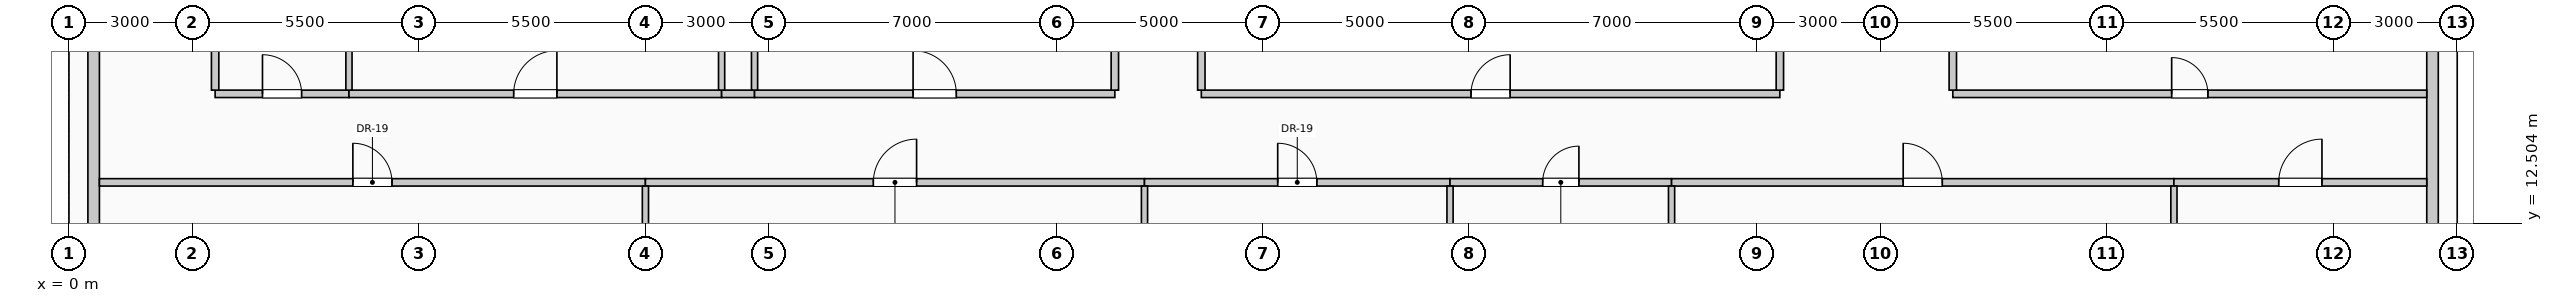
"""IFC4 building model, lengths in metres.
Left out: names, types, materials, properties, quantities, classifications, styles, units other than length and angle.
Written with IfcOpenShell. Run it as: python <this file> out.ifc"""

import sys

from ifc_helpers import new_model, si_unit, direction, frame, frame_2d, origin, place, context, subcontext, project, spatial, rectangle, extrude, element, fill, save


model = new_model("IFC4")
c1 = context("Model", 3, precision=1e-05, world=origin(), true_north=direction((0.0, 1.0)))
c2 = subcontext(c1, "Body", "Model", "MODEL_VIEW")
j1 = project(units=[si_unit("LENGTHUNIT", "METRE"), si_unit("PLANEANGLEUNIT", "RADIAN")], contexts=[c1])
p1 = place(None, origin())
s1 = spatial("IfcSite", under=j1, at=p1, CompositionType="ELEMENT")
p2 = place(p1, origin())
s2 = spatial("IfcBuilding", under=s1, at=p2, CompositionType="ELEMENT")
p3 = place(p2, frame((0.0, 0.0, 112.6)))
s3 = spatial("IfcBuildingStorey", under=s2, at=p3, CompositionType="ELEMENT", Elevation=112.6)
for number, where, z_axis, x_axis in (
    (1, (0.6, 10.445, 0.0), (0.0, 0.0, 1.0), (0.0, 1.0, 0.0)),
    (2, (57.4, 17.555, 0.0), (0.0, 0.0, 1.0), (0.0, -1.0, 0.0)),
):
    element("IfcWall", number, at=place(p3, frame(where, z_axis=z_axis, x_axis=x_axis)), inside=s3, PredefinedType="SOLIDWALL", context=c2, shape_type="SweptSolid", body=[
        extrude(rectangle(XDim=7.11, YDim=0.28, at=frame_2d((3.555, 0.0))), origin(), (0.0, 0.0, 1.0), 2.875),
    ])
p4 = place(p3, frame((0.74, 13.5, 0.0), z_axis=(0.0, 0.0, 1.0), x_axis=(1.0, 0.0, 0.0)))
e3 = element("IfcWall", 3, at=p4, inside=s3, PredefinedType="PARTITIONING", context=c2, shape_type="SweptSolid", body=[
    extrude(rectangle(XDim=13.26, YDim=0.18, at=frame_2d((6.63, 0.0))), origin(), (0.0, 0.0, 1.0), 3.725),
])
p5 = place(p4, frame((6.155, 0.0, 0.0)))
e4 = element("IfcOpeningElement", 4, at=p5, cuts=e3, PredefinedType="OPENING", context=c2, shape_type="SweptSolid", body=[
    extrude(rectangle(XDim=0.95, YDim=2.15, at=frame_2d((0.475, 1.075))), frame((0.0, 0.1, 0.0), z_axis=(0.0, -1.0, 0.0), x_axis=(1.0, 0.0, 0.0)), (0.0, 0.0, 1.0), 0.2),
])
p6 = place(p3, frame((14.0, 13.5, 0.0), z_axis=(0.0, 0.0, 1.0), x_axis=(1.0, 0.0, 0.0)))
e5 = element("IfcWall", 5, at=p6, inside=s3, PredefinedType="PARTITIONING", context=c2, shape_type="SweptSolid", body=[
    extrude(rectangle(XDim=12.12, YDim=0.18, at=frame_2d((6.06, 0.0))), origin(), (0.0, 0.0, 1.0), 3.725),
])
p7 = place(p6, frame((5.535, 0.0, 0.0)))
e6 = element("IfcOpeningElement", 6, at=p7, cuts=e5, PredefinedType="OPENING", context=c2, shape_type="SweptSolid", body=[
    extrude(rectangle(XDim=1.05, YDim=2.15, at=frame_2d((0.525, 1.075))), frame((0.0, 0.1, 0.0), z_axis=(0.0, -1.0, 0.0), x_axis=(1.0, 0.0, 0.0)), (0.0, 0.0, 1.0), 0.2),
])
p8 = place(p3, frame((26.12, 13.5, 0.0), z_axis=(0.0, 0.0, 1.0), x_axis=(1.0, 0.0, 0.0)))
e7 = element("IfcWall", 7, at=p8, inside=s3, PredefinedType="PARTITIONING", context=c2, shape_type="SweptSolid", body=[
    extrude(rectangle(XDim=7.42, YDim=0.18, at=frame_2d((3.71, 0.0))), origin(), (0.0, 0.0, 1.0), 3.725),
])
p9 = place(p8, frame((3.235, 0.0, 0.0)))
e8 = element("IfcOpeningElement", 8, at=p9, cuts=e7, PredefinedType="OPENING", context=c2, shape_type="SweptSolid", body=[
    extrude(rectangle(XDim=0.95, YDim=2.15, at=frame_2d((0.475, 1.075))), frame((0.0, 0.1, 0.0), z_axis=(0.0, -1.0, 0.0), x_axis=(1.0, 0.0, 0.0)), (0.0, 0.0, 1.0), 0.2),
])
p10 = place(p3, frame((33.54, 13.5, 0.0), z_axis=(0.0, 0.0, 1.0), x_axis=(1.0, 0.0, 0.0)))
e9 = element("IfcWall", 9, at=p10, inside=s3, PredefinedType="PARTITIONING", context=c2, shape_type="SweptSolid", body=[
    extrude(rectangle(XDim=5.38, YDim=0.18, at=frame_2d((2.69, 0.0))), origin(), (0.0, 0.0, 1.0), 3.725),
])
p11 = place(p10, frame((2.25, 0.0, 0.0)))
e10 = element("IfcOpeningElement", 10, at=p11, cuts=e9, PredefinedType="OPENING", context=c2, shape_type="SweptSolid", body=[
    extrude(rectangle(XDim=0.88, YDim=2.1, at=frame_2d((0.44, 1.05))), frame((0.0, 0.1, 0.0), z_axis=(0.0, -1.0, 0.0), x_axis=(1.0, 0.0, 0.0)), (0.0, 0.0, 1.0), 0.2),
])
p12 = place(p3, frame((38.92, 13.5, 0.0), z_axis=(0.0, 0.0, 1.0), x_axis=(1.0, 0.0, 0.0)))
e11 = element("IfcWall", 11, at=p12, inside=s3, PredefinedType="PARTITIONING", context=c2, shape_type="SweptSolid", body=[
    extrude(rectangle(XDim=12.2, YDim=0.18, at=frame_2d((6.1, 0.0))), origin(), (0.0, 0.0, 1.0), 3.725),
])
p13 = place(p12, frame((5.625, 0.0, 0.0)))
e12 = element("IfcOpeningElement", 12, at=p13, cuts=e11, PredefinedType="OPENING", context=c2, shape_type="SweptSolid", body=[
    extrude(rectangle(XDim=0.95, YDim=2.15, at=frame_2d((0.475, 1.075))), frame((0.0, 0.1, 0.0), z_axis=(0.0, -1.0, 0.0), x_axis=(1.0, 0.0, 0.0)), (0.0, 0.0, 1.0), 0.2),
])
p14 = place(p3, frame((51.12, 13.5, 0.0), z_axis=(0.0, 0.0, 1.0), x_axis=(1.0, 0.0, 0.0)))
e13 = element("IfcWall", 13, at=p14, inside=s3, PredefinedType="PARTITIONING", context=c2, shape_type="SweptSolid", body=[
    extrude(rectangle(XDim=6.14, YDim=0.18, at=frame_2d((3.07, 0.0))), origin(), (0.0, 0.0, 1.0), 3.725),
])
p15 = place(p14, frame((2.545, 0.0, 0.0)))
e14 = element("IfcOpeningElement", 14, at=p15, cuts=e13, PredefinedType="OPENING", context=c2, shape_type="SweptSolid", body=[
    extrude(rectangle(XDim=1.05, YDim=2.15, at=frame_2d((0.525, 1.075))), frame((0.0, 0.1, 0.0), z_axis=(0.0, -1.0, 0.0), x_axis=(1.0, 0.0, 0.0)), (0.0, 0.0, 1.0), 0.2),
])
p16 = place(p3, frame((3.55, 15.65, 0.0), z_axis=(0.0, 0.0, 1.0), x_axis=(1.0, 0.0, 0.0)))
e15 = element("IfcWall", 15, at=p16, inside=s3, PredefinedType="PARTITIONING", context=c2, shape_type="SweptSolid", body=[
    extrude(rectangle(XDim=3.25, YDim=0.18, at=frame_2d((1.625, 0.0))), origin(), (0.0, 0.0, 1.0), 3.725),
])
p17 = place(p16, frame((1.15, 0.0, 0.0)))
e16 = element("IfcOpeningElement", 16, at=p17, cuts=e15, PredefinedType="OPENING", context=c2, shape_type="SweptSolid", body=[
    extrude(rectangle(XDim=0.95, YDim=2.15, at=frame_2d((0.475, 1.075))), frame((0.0, 0.1, 0.0), z_axis=(0.0, -1.0, 0.0), x_axis=(1.0, 0.0, 0.0)), (0.0, 0.0, 1.0), 0.2),
])
p18 = place(p3, frame((6.8, 15.65, 0.0), z_axis=(0.0, 0.0, 1.0), x_axis=(1.0, 0.0, 0.0)))
e17 = element("IfcWall", 17, at=p18, inside=s3, PredefinedType="PARTITIONING", context=c2, shape_type="SweptSolid", body=[
    extrude(rectangle(XDim=9.05, YDim=0.18, at=frame_2d((4.525, 0.0))), origin(), (0.0, 0.0, 1.0), 3.725),
])
p19 = place(p18, frame((4.0, 0.0, 0.0)))
e18 = element("IfcOpeningElement", 18, at=p19, cuts=e17, PredefinedType="OPENING", context=c2, shape_type="SweptSolid", body=[
    extrude(rectangle(XDim=1.05, YDim=2.15, at=frame_2d((0.525, 1.075))), frame((0.0, 0.1, 0.0), z_axis=(0.0, -1.0, 0.0), x_axis=(1.0, 0.0, 0.0)), (0.0, 0.0, 1.0), 0.2),
])
p20 = place(p3, frame((15.85, 15.65, 0.0), z_axis=(0.0, 0.0, 1.0), x_axis=(1.0, 0.0, 0.0)))
e19 = element("IfcWall", 19, at=p20, inside=s3, PredefinedType="PARTITIONING", context=c2, shape_type="SweptSolid", body=[
    extrude(rectangle(XDim=0.8, YDim=0.18, at=frame_2d((0.4, 0.0))), origin(), (0.0, 0.0, 1.0), 3.725),
])
p21 = place(p3, frame((16.65, 15.65, 0.0), z_axis=(0.0, 0.0, 1.0), x_axis=(1.0, 0.0, 0.0)))
e20 = element("IfcWall", 20, at=p21, inside=s3, PredefinedType="PARTITIONING", context=c2, shape_type="SweptSolid", body=[
    extrude(rectangle(XDim=8.75, YDim=0.18, at=frame_2d((4.375, 0.0))), origin(), (0.0, 0.0, 1.0), 3.725),
])
p22 = place(p21, frame((3.85, 0.0, 0.0)))
e21 = element("IfcOpeningElement", 21, at=p22, cuts=e20, PredefinedType="OPENING", context=c2, shape_type="SweptSolid", body=[
    extrude(rectangle(XDim=1.05, YDim=2.15, at=frame_2d((0.525, 1.075))), frame((0.0, 0.1, 0.0), z_axis=(0.0, -1.0, 0.0), x_axis=(1.0, 0.0, 0.0)), (0.0, 0.0, 1.0), 0.2),
])
p23 = place(p3, frame((27.5, 15.65, 0.0), z_axis=(0.0, 0.0, 1.0), x_axis=(1.0, 0.0, 0.0)))
e22 = element("IfcWall", 22, at=p23, inside=s3, PredefinedType="PARTITIONING", context=c2, shape_type="SweptSolid", body=[
    extrude(rectangle(XDim=14.05, YDim=0.18, at=frame_2d((7.025, 0.0))), origin(), (0.0, 0.0, 1.0), 3.725),
])
p24 = place(p23, frame((6.55, 0.0, 0.0)))
e23 = element("IfcOpeningElement", 23, at=p24, cuts=e22, PredefinedType="OPENING", context=c2, shape_type="SweptSolid", body=[
    extrude(rectangle(XDim=0.95, YDim=2.15, at=frame_2d((0.475, 1.075))), frame((0.0, 0.1, 0.0), z_axis=(0.0, -1.0, 0.0), x_axis=(1.0, 0.0, 0.0)), (0.0, 0.0, 1.0), 0.2),
])
p25 = place(p3, frame((45.75, 15.65, 0.0), z_axis=(0.0, 0.0, 1.0), x_axis=(1.0, 0.0, 0.0)))
e24 = element("IfcWall", 24, at=p25, inside=s3, PredefinedType="PARTITIONING", context=c2, shape_type="SweptSolid", body=[
    extrude(rectangle(XDim=11.51, YDim=0.18, at=frame_2d((5.755, 0.0))), origin(), (0.0, 0.0, 1.0), 3.725),
])
p26 = place(p25, frame((5.315, 0.0, 0.0)))
e25 = element("IfcOpeningElement", 25, at=p26, cuts=e24, PredefinedType="OPENING", context=c2, shape_type="SweptSolid", body=[
    extrude(rectangle(XDim=0.88, YDim=2.1, at=frame_2d((0.44, 1.05))), frame((0.0, 0.1, 0.0), z_axis=(0.0, -1.0, 0.0), x_axis=(1.0, 0.0, 0.0)), (0.0, 0.0, 1.0), 0.2),
])
p27 = place(p3, frame((3.55, 15.74, 0.0), z_axis=(0.0, 0.0, 1.0), x_axis=(0.0, 1.0, 0.0)))
e26 = element("IfcWall", 26, at=p27, inside=s3, PredefinedType="PARTITIONING", context=c2, shape_type="SweptSolid", body=[
    extrude(rectangle(XDim=3.135, YDim=0.18, at=frame_2d((1.567, 0.0))), origin(), (0.0, 0.0, 1.0), 3.725),
])
p28 = place(p3, frame((6.8, 15.74, 0.0), z_axis=(0.0, 0.0, 1.0), x_axis=(0.0, 1.0, 0.0)))
e27 = element("IfcWall", 27, at=p28, inside=s3, PredefinedType="PARTITIONING", context=c2, shape_type="SweptSolid", body=[
    extrude(rectangle(XDim=3.135, YDim=0.15, at=frame_2d((1.567, 0.0))), origin(), (0.0, 0.0, 1.0), 3.725),
])
p29 = place(p3, frame((14.0, 1.175, 0.0), z_axis=(0.0, 0.0, 1.0), x_axis=(0.0, 1.0, 0.0)))
e28 = element("IfcWall", 28, at=p29, inside=s3, PredefinedType="PARTITIONING", context=c2, shape_type="SweptSolid", body=[
    extrude(rectangle(XDim=12.235, YDim=0.15, at=frame_2d((6.117, 0.0))), origin(), (0.0, 0.0, 1.0), 3.725),
])
p30 = place(p3, frame((15.85, 15.74, 0.0), z_axis=(0.0, 0.0, 1.0), x_axis=(0.0, 1.0, 0.0)))
e29 = element("IfcWall", 29, at=p30, inside=s3, PredefinedType="PARTITIONING", context=c2, shape_type="SweptSolid", body=[
    extrude(rectangle(XDim=1.76, YDim=0.15, at=frame_2d((0.88, 0.0))), origin(), (0.0, 0.0, 1.0), 3.725),
])
p31 = place(p3, frame((16.65, 15.74, 0.0), z_axis=(0.0, 0.0, 1.0), x_axis=(0.0, 1.0, 0.0)))
e30 = element("IfcWall", 30, at=p31, inside=s3, PredefinedType="PARTITIONING", context=c2, shape_type="SweptSolid", body=[
    extrude(rectangle(XDim=1.76, YDim=0.15, at=frame_2d((0.88, 0.0))), origin(), (0.0, 0.0, 1.0), 3.07),
])
p32 = place(p3, frame((25.4, 15.74, 0.0), z_axis=(0.0, 0.0, 1.0), x_axis=(0.0, 1.0, 0.0)))
e31 = element("IfcWall", 31, at=p32, inside=s3, PredefinedType="PARTITIONING", context=c2, shape_type="SweptSolid", body=[
    extrude(rectangle(XDim=7.585, YDim=0.18, at=frame_2d((3.792, 0.0))), origin(), (0.0, 0.0, 1.0), 3.725),
])
p33 = place(p3, frame((26.12, 0.74, 0.0), z_axis=(0.0, 0.0, 1.0), x_axis=(0.0, 1.0, 0.0)))
e32 = element("IfcWall", 32, at=p33, inside=s3, PredefinedType="PARTITIONING", context=c2, shape_type="SweptSolid", body=[
    extrude(rectangle(XDim=12.67, YDim=0.15, at=frame_2d((6.335, 0.0))), origin(), (0.0, 0.0, 1.0), 3.725),
])
p34 = place(p3, frame((27.5, 15.74, 0.0), z_axis=(0.0, 0.0, 1.0), x_axis=(0.0, 1.0, 0.0)))
e33 = element("IfcWall", 33, at=p34, inside=s3, PredefinedType="PARTITIONING", context=c2, shape_type="SweptSolid", body=[
    extrude(rectangle(XDim=9.57, YDim=0.18, at=frame_2d((4.785, 0.0))), origin(), (0.0, 0.0, 1.0), 3.725),
])
p35 = place(p3, frame((33.54, 1.3, 0.0), z_axis=(0.0, 0.0, 1.0), x_axis=(0.0, 1.0, 0.0)))
e34 = element("IfcWall", 34, at=p35, inside=s3, PredefinedType="PARTITIONING", context=c2, shape_type="SweptSolid", body=[
    extrude(rectangle(XDim=12.11, YDim=0.15, at=frame_2d((6.055, 0.0))), origin(), (0.0, 0.0, 1.0), 3.725),
])
p36 = place(p3, frame((38.92, 0.74, 0.0), z_axis=(0.0, 0.0, 1.0), x_axis=(0.0, 1.0, 0.0)))
e35 = element("IfcWall", 35, at=p36, inside=s3, PredefinedType="PARTITIONING", context=c2, shape_type="SweptSolid", body=[
    extrude(rectangle(XDim=12.67, YDim=0.15, at=frame_2d((6.335, 0.0))), origin(), (0.0, 0.0, 1.0), 3.725),
])
p37 = place(p3, frame((41.55, 15.74, 0.0), z_axis=(0.0, 0.0, 1.0), x_axis=(0.0, 1.0, 0.0)))
e36 = element("IfcWall", 36, at=p37, inside=s3, PredefinedType="PARTITIONING", context=c2, shape_type="SweptSolid", body=[
    extrude(rectangle(XDim=1.76, YDim=0.18, at=frame_2d((0.88, 0.0))), origin(), (0.0, 0.0, 1.0), 3.07),
])
p38 = place(p3, frame((45.75, 15.74, 0.0), z_axis=(0.0, 0.0, 1.0), x_axis=(0.0, 1.0, 0.0)))
e37 = element("IfcWall", 37, at=p38, inside=s3, PredefinedType="PARTITIONING", context=c2, shape_type="SweptSolid", body=[
    extrude(rectangle(XDim=16.535, YDim=0.18, at=frame_2d((8.268, 0.0))), origin(), (0.0, 0.0, 1.0), 3.725),
])
p39 = place(p3, frame((51.12, 0.74, 0.0), z_axis=(0.0, 0.0, 1.0), x_axis=(0.0, 1.0, 0.0)))
e38 = element("IfcWall", 38, at=p39, inside=s3, PredefinedType="PARTITIONING", context=c2, shape_type="SweptSolid", body=[
    extrude(rectangle(XDim=12.67, YDim=0.15, at=frame_2d((6.335, 0.0))), origin(), (0.0, 0.0, 1.0), 3.725),
])
p40 = place(p5, origin())
e39 = element("IfcDoor", 39, at=p40, inside=s3, OperationType="SINGLE_SWING_LEFT", PredefinedType="DOOR", context=c2, shape_type="SweptSolid", body=[
    extrude(rectangle(XDim=0.95, YDim=2.15, at=frame_2d((0.475, 1.075))), frame((0.0, 0.025, 0.0), z_axis=(0.0, -1.0, 0.0), x_axis=(1.0, 0.0, 0.0)), (0.0, 0.0, 1.0), 0.05),
])
fill(e4, e39)
p41 = place(p7, origin())
e40 = element("IfcDoor", 40, at=p41, inside=s3, OperationType="SINGLE_SWING_RIGHT", PredefinedType="DOOR", context=c2, shape_type="SweptSolid", body=[
    extrude(rectangle(XDim=1.05, YDim=2.15, at=frame_2d((0.525, 1.075))), frame((0.0, 0.025, 0.0), z_axis=(0.0, -1.0, 0.0), x_axis=(1.0, 0.0, 0.0)), (0.0, 0.0, 1.0), 0.05),
])
fill(e6, e40)
p42 = place(p9, origin())
e41 = element("IfcDoor", 41, at=p42, inside=s3, OperationType="SINGLE_SWING_LEFT", PredefinedType="DOOR", context=c2, shape_type="SweptSolid", body=[
    extrude(rectangle(XDim=0.95, YDim=2.15, at=frame_2d((0.475, 1.075))), frame((0.0, 0.025, 0.0), z_axis=(0.0, -1.0, 0.0), x_axis=(1.0, 0.0, 0.0)), (0.0, 0.0, 1.0), 0.05),
])
fill(e8, e41)
p43 = place(p11, origin())
e42 = element("IfcDoor", 42, at=p43, inside=s3, OperationType="SINGLE_SWING_RIGHT", PredefinedType="DOOR", context=c2, shape_type="SweptSolid", body=[
    extrude(rectangle(XDim=0.88, YDim=2.1, at=frame_2d((0.44, 1.05))), frame((0.0, 0.025, 0.0), z_axis=(0.0, -1.0, 0.0), x_axis=(1.0, 0.0, 0.0)), (0.0, 0.0, 1.0), 0.05),
])
fill(e10, e42)
p44 = place(p13, origin())
e43 = element("IfcDoor", 43, at=p44, inside=s3, OperationType="SINGLE_SWING_LEFT", PredefinedType="DOOR", context=c2, shape_type="SweptSolid", body=[
    extrude(rectangle(XDim=0.95, YDim=2.15, at=frame_2d((0.475, 1.075))), frame((0.0, 0.025, 0.0), z_axis=(0.0, -1.0, 0.0), x_axis=(1.0, 0.0, 0.0)), (0.0, 0.0, 1.0), 0.05),
])
fill(e12, e43)
p45 = place(p15, origin())
e44 = element("IfcDoor", 44, at=p45, inside=s3, OperationType="SINGLE_SWING_RIGHT", PredefinedType="DOOR", context=c2, shape_type="SweptSolid", body=[
    extrude(rectangle(XDim=1.05, YDim=2.15, at=frame_2d((0.525, 1.075))), frame((0.0, 0.025, 0.0), z_axis=(0.0, -1.0, 0.0), x_axis=(1.0, 0.0, 0.0)), (0.0, 0.0, 1.0), 0.05),
])
fill(e14, e44)
p46 = place(p17, origin())
e45 = element("IfcDoor", 45, at=p46, inside=s3, OperationType="SINGLE_SWING_LEFT", PredefinedType="DOOR", context=c2, shape_type="SweptSolid", body=[
    extrude(rectangle(XDim=0.95, YDim=2.15, at=frame_2d((0.475, 1.075))), frame((0.0, 0.025, 0.0), z_axis=(0.0, -1.0, 0.0), x_axis=(1.0, 0.0, 0.0)), (0.0, 0.0, 1.0), 0.05),
])
fill(e16, e45)
p47 = place(p19, origin())
e46 = element("IfcDoor", 46, at=p47, inside=s3, OperationType="SINGLE_SWING_RIGHT", PredefinedType="DOOR", context=c2, shape_type="SweptSolid", body=[
    extrude(rectangle(XDim=1.05, YDim=2.15, at=frame_2d((0.525, 1.075))), frame((0.0, 0.025, 0.0), z_axis=(0.0, -1.0, 0.0), x_axis=(1.0, 0.0, 0.0)), (0.0, 0.0, 1.0), 0.05),
])
fill(e18, e46)
p48 = place(p22, origin())
e47 = element("IfcDoor", 47, at=p48, inside=s3, OperationType="SINGLE_SWING_LEFT", PredefinedType="DOOR", context=c2, shape_type="SweptSolid", body=[
    extrude(rectangle(XDim=1.05, YDim=2.15, at=frame_2d((0.525, 1.075))), frame((0.0, 0.025, 0.0), z_axis=(0.0, -1.0, 0.0), x_axis=(1.0, 0.0, 0.0)), (0.0, 0.0, 1.0), 0.05),
])
fill(e21, e47)
p49 = place(p24, origin())
e48 = element("IfcDoor", 48, at=p49, inside=s3, OperationType="SINGLE_SWING_RIGHT", PredefinedType="DOOR", context=c2, shape_type="SweptSolid", body=[
    extrude(rectangle(XDim=0.95, YDim=2.15, at=frame_2d((0.475, 1.075))), frame((0.0, 0.025, 0.0), z_axis=(0.0, -1.0, 0.0), x_axis=(1.0, 0.0, 0.0)), (0.0, 0.0, 1.0), 0.05),
])
fill(e23, e48)
p50 = place(p26, origin())
e49 = element("IfcDoor", 49, at=p50, inside=s3, OperationType="SINGLE_SWING_LEFT", PredefinedType="DOOR", context=c2, shape_type="SweptSolid", body=[
    extrude(rectangle(XDim=0.88, YDim=2.1, at=frame_2d((0.44, 1.05))), frame((0.0, 0.025, 0.0), z_axis=(0.0, -1.0, 0.0), x_axis=(1.0, 0.0, 0.0)), (0.0, 0.0, 1.0), 0.05),
])
fill(e25, e49)
save(model, sys.argv[1])
